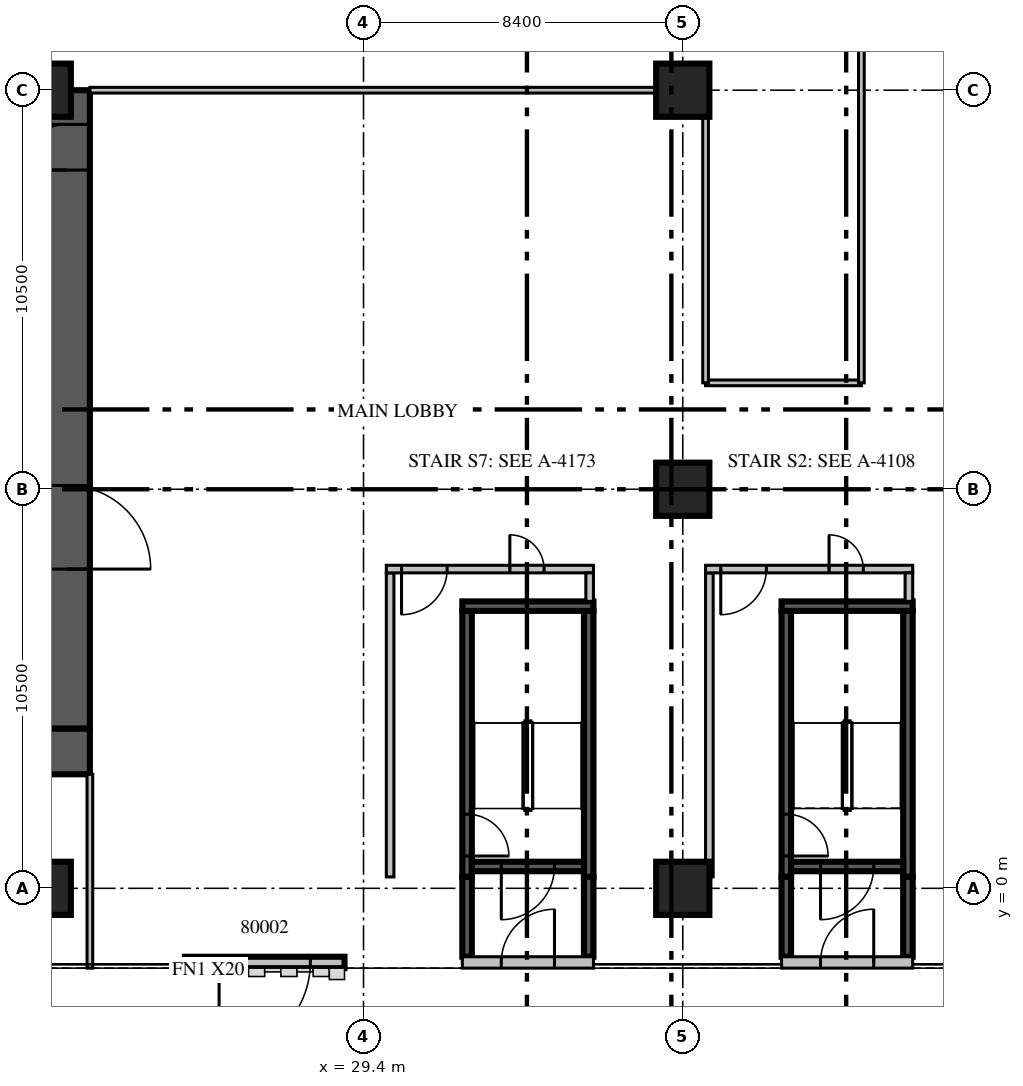
"""IFC4 building model, lengths in metres.
Left out: names, types, materials, properties, quantities, classifications, styles, units other than length and angle.
Written with IfcOpenShell. Run it as: python <this file> out.ifc"""

import sys

from ifc_helpers import new_model, si_unit, direction, frame, frame_2d, origin, origin_2d, place, context, subcontext, project, spatial, rectangle, extrude, source, transform, mapped, element, fill, save


model = new_model("IFC4")
c1 = context("Model", 3, precision=1e-05, world=origin(), true_north=direction((0.0, 1.0)))
c2 = subcontext(c1, "Body", "Model", "MODEL_VIEW")
j1 = project(units=[si_unit("LENGTHUNIT", "METRE"), si_unit("PLANEANGLEUNIT", "RADIAN")], contexts=[c1])
p1 = place(None, origin())
s1 = spatial("IfcSite", under=j1, at=p1, CompositionType="ELEMENT")
p2 = place(p1, origin())
s2 = spatial("IfcBuilding", under=s1, at=p2, CompositionType="ELEMENT")
p3 = place(p2, origin())
s3 = spatial("IfcBuildingStorey", under=s2, at=p3, CompositionType="ELEMENT", Elevation=0.0)
m1 = source(origin(), c2, "Body", "SweptSolid", [
    extrude(rectangle(XDim=1.4, YDim=1.4, at=origin_2d()), origin(), (0.0, 0.0, 1.0), 7.5),
])
for number, where, z_axis, x_axis in (
    (1, (21.0, 0.0, 0.0), (0.0, 0.0, 1.0), (1.0, 0.0, 0.0)),
    (2, (21.0, 21.0, 0.0), (0.0, 0.0, 1.0), (1.0, 0.0, 0.0)),
    (3, (37.8, 0.0, 0.0), (0.0, 0.0, 1.0), (1.0, 0.0, 0.0)),
    (4, (37.8, 10.5, 0.0), (0.0, 0.0, 1.0), (1.0, 0.0, 0.0)),
    (5, (37.8, 21.0, 0.0), (0.0, 0.0, 1.0), (1.0, 0.0, 0.0)),
):
    element("IfcColumn", number, at=place(p3, frame(where, z_axis=z_axis, x_axis=x_axis)), inside=s3, PredefinedType="COLUMN", context=c2, shape_type="MappedRepresentation", body=[
        mapped(m1, transform((0.0, 0.0, 0.0), scale=1.0)),
    ])
p4 = place(p3, frame((21.6, 4.2, 0.0), z_axis=(0.0, 0.0, 1.0), x_axis=(0.0, 1.0, 0.0)))
e6 = element("IfcWall", 6, at=p4, inside=s3, PredefinedType="SHEAR", context=c2, shape_type="SweptSolid", body=[
    extrude(rectangle(XDim=16.8, YDim=1.2, at=frame_2d((8.4, 0.0))), origin(), (0.0, 0.0, 1.0), 7.5),
])
m2 = source(origin(), c2, "Body", "SweptSolid", [
    extrude(rectangle(XDim=2.2, YDim=2.1, at=frame_2d((1.1, 1.05))), frame((0.0, 0.61, 0.0), z_axis=(0.0, -1.0, 0.0), x_axis=(1.0, 0.0, 0.0)), (0.0, 0.0, 1.0), 1.22),
])
p5 = place(p4, frame((4.2, 0.0, 0.0)))
e7 = element("IfcOpeningElement", 7, at=p5, cuts=e6, PredefinedType="OPENING", context=c2, shape_type="MappedRepresentation", body=[
    mapped(m2, transform((0.0, 0.0, 0.0), scale=1.0)),
])
m3 = source(origin(), c2, "Body", "SweptSolid", [
    extrude(rectangle(XDim=1.2, YDim=2.1, at=frame_2d((0.6, 1.05))), frame((0.0, 0.61, 0.0), z_axis=(0.0, -1.0, 0.0), x_axis=(1.0, 0.0, 0.0)), (0.0, 0.0, 1.0), 1.22),
])
p6 = place(p4, frame((14.7, 0.0, 0.0)))
e8 = element("IfcOpeningElement", 8, at=p6, cuts=e6, PredefinedType="OPENING", context=c2, shape_type="MappedRepresentation", body=[
    mapped(m3, transform((0.0, 0.0, 0.0), scale=1.0)),
])
m4 = source(origin(), c2, "Body", "SweptSolid", [
    extrude(rectangle(XDim=18.0, YDim=1.2, at=frame_2d((9.0, 0.0))), origin(), (0.0, 0.0, 1.0), 7.5),
])
p7 = place(p3, frame((4.2, 3.6, 0.0), z_axis=(0.0, 0.0, 1.0), x_axis=(1.0, 0.0, 0.0)))
e9 = element("IfcWall", 9, at=p7, inside=s3, PredefinedType="SHEAR", context=c2, shape_type="MappedRepresentation", body=[
    mapped(m4, transform((0.0, 0.0, 0.0), scale=1.0)),
])
p8 = place(p3, frame((24.7, -1.95, 0.0), z_axis=(0.0, 0.0, 1.0), x_axis=(1.0, 0.0, 0.0)))
e10 = element("IfcWall", 10, at=p8, inside=s3, PredefinedType="STANDARD", context=c2, shape_type="SweptSolid", body=[
    extrude(rectangle(XDim=4.2, YDim=0.3, at=frame_2d((2.1, 0.0))), origin(), (0.0, 0.0, 1.0), 6.9),
])
p9 = place(p8, frame((0.9, 0.0, 0.0)))
e11 = element("IfcOpeningElement", 11, at=p9, cuts=e10, PredefinedType="OPENING", context=c2, shape_type="SweptSolid", body=[
    extrude(rectangle(XDim=2.4, YDim=2.4, at=frame_2d((1.2, 1.2))), frame((0.0, 0.16, 0.0), z_axis=(0.0, -1.0, 0.0), x_axis=(1.0, 0.0, 0.0)), (0.0, 0.0, 1.0), 0.32),
])
p10 = place(p3, frame((40.525, 0.3, 0.0), z_axis=(0.0, 0.0, 1.0), x_axis=(0.0, 1.0, 0.0)))
e12 = element("IfcWall", 12, at=p10, inside=s3, PredefinedType="SOLIDWALL", context=c2, shape_type="SweptSolid", body=[
    extrude(rectangle(XDim=7.0, YDim=0.25, at=frame_2d((3.5, 0.0))), origin(), (0.0, 0.0, 1.0), 6.9),
])
m5 = source(origin(), c2, "Body", "SweptSolid", [
    extrude(rectangle(XDim=1.1, YDim=2.1, at=frame_2d((0.55, 1.05))), frame((0.0, 0.135, 0.0), z_axis=(0.0, -1.0, 0.0), x_axis=(1.0, 0.0, 0.0)), (0.0, 0.0, 1.0), 0.27),
])
p11 = place(p10, frame((0.55, 0.0, 0.0)))
e13 = element("IfcOpeningElement", 13, at=p11, cuts=e12, PredefinedType="OPENING", context=c2, shape_type="MappedRepresentation", body=[
    mapped(m5, transform((0.0, 0.0, 0.0), scale=1.0)),
])
m6 = source(origin(), c2, "Body", "SweptSolid", [
    extrude(rectangle(XDim=7.0, YDim=0.25, at=frame_2d((3.5, 0.0))), origin(), (0.0, 0.0, 1.0), 6.9),
])
p12 = place(p3, frame((43.725, 0.3, 0.0), z_axis=(0.0, 0.0, 1.0), x_axis=(0.0, 1.0, 0.0)))
e14 = element("IfcWall", 14, at=p12, inside=s3, PredefinedType="SOLIDWALL", context=c2, shape_type="MappedRepresentation", body=[
    mapped(m6, transform((0.0, 0.0, 0.0), scale=1.0)),
])
p13 = place(p3, frame((40.4, 7.425, 0.0), z_axis=(0.0, 0.0, 1.0), x_axis=(1.0, 0.0, 0.0)))
e15 = element("IfcWall", 15, at=p13, inside=s3, PredefinedType="SOLIDWALL", context=c2, shape_type="SweptSolid", body=[
    extrude(rectangle(XDim=3.45, YDim=0.25, at=frame_2d((1.725, 0.0))), origin(), (0.0, 0.0, 1.0), 6.9),
])
p14 = place(p3, frame((40.65, 0.575, 0.0), z_axis=(0.0, 0.0, 1.0), x_axis=(1.0, 0.0, 0.0)))
e16 = element("IfcWall", 16, at=p14, inside=s3, PredefinedType="SOLIDWALL", context=c2, shape_type="SweptSolid", body=[
    extrude(rectangle(XDim=2.95, YDim=0.25, at=frame_2d((1.475, 0.0))), origin(), (0.0, 0.0, 1.0), 6.9),
])
p15 = place(p14, frame((0.775, 0.0, 0.0)))
e17 = element("IfcOpeningElement", 17, at=p15, cuts=e16, PredefinedType="OPENING", context=c2, shape_type="SweptSolid", body=[
    extrude(rectangle(XDim=1.4, YDim=2.1, at=frame_2d((0.7, 1.05))), frame((0.0, 0.135, 0.0), z_axis=(0.0, -1.0, 0.0), x_axis=(1.0, 0.0, 0.0)), (0.0, 0.0, 1.0), 0.27),
])
p16 = place(p3, frame((38.5, 0.3, 0.0), z_axis=(0.0, 0.0, 1.0), x_axis=(0.0, 1.0, 0.0)))
e18 = element("IfcWall", 18, at=p16, inside=s3, PredefinedType="PARTITIONING", context=c2, shape_type="SweptSolid", body=[
    extrude(rectangle(XDim=8.0, YDim=0.2, at=frame_2d((4.0, 0.0))), origin(), (0.0, 0.0, 1.0), 6.9),
])
p17 = place(p3, frame((38.4, 8.4, 0.0), z_axis=(0.0, 0.0, 1.0), x_axis=(1.0, 0.0, 0.0)))
e19 = element("IfcWall", 19, at=p17, inside=s3, PredefinedType="PARTITIONING", context=c2, shape_type="SweptSolid", body=[
    extrude(rectangle(XDim=5.45, YDim=0.2, at=frame_2d((2.725, 0.0))), origin(), (0.0, 0.0, 1.0), 6.9),
])
m7 = source(origin(), c2, "Body", "SweptSolid", [
    extrude(rectangle(XDim=1.2, YDim=2.1, at=frame_2d((0.6, 1.05))), frame((0.0, 0.11, 0.0), z_axis=(0.0, -1.0, 0.0), x_axis=(1.0, 0.0, 0.0)), (0.0, 0.0, 1.0), 0.22),
])
p18 = place(p17, frame((0.4, 0.0, 0.0)))
e20 = element("IfcOpeningElement", 20, at=p18, cuts=e19, PredefinedType="OPENING", context=c2, shape_type="MappedRepresentation", body=[
    mapped(m7, transform((0.0, 0.0, 0.0), scale=1.0)),
])
m8 = source(origin(), c2, "Body", "SweptSolid", [
    extrude(rectangle(XDim=0.9, YDim=2.1, at=frame_2d((0.45, 1.05))), frame((0.0, 0.11, 0.0), z_axis=(0.0, -1.0, 0.0), x_axis=(1.0, 0.0, 0.0)), (0.0, 0.0, 1.0), 0.22),
])
p19 = place(p17, frame((3.25, 0.0, 0.0)))
e21 = element("IfcOpeningElement", 21, at=p19, cuts=e19, PredefinedType="OPENING", context=c2, shape_type="MappedRepresentation", body=[
    mapped(m8, transform((0.0, 0.0, 0.0), scale=1.0)),
])
p20 = place(p3, frame((43.75, 7.55, 0.0), z_axis=(0.0, 0.0, 1.0), x_axis=(0.0, 1.0, 0.0)))
e22 = element("IfcWall", 22, at=p20, inside=s3, PredefinedType="PARTITIONING", context=c2, shape_type="SweptSolid", body=[
    extrude(rectangle(XDim=0.75, YDim=0.2, at=frame_2d((0.375, 0.0))), origin(), (0.0, 0.0, 1.0), 6.9),
])
p21 = place(p3, frame((40.525, -1.8, 0.0), z_axis=(0.0, 0.0, 1.0), x_axis=(0.0, 1.0, 0.0)))
e23 = element("IfcWall", 23, at=p21, inside=s3, PredefinedType="SOLIDWALL", context=c2, shape_type="SweptSolid", body=[
    extrude(rectangle(XDim=2.1, YDim=0.25, at=frame_2d((1.05, 0.0))), origin(), (0.0, 0.0, 1.0), 6.9),
])
m9 = source(origin(), c2, "Body", "SweptSolid", [
    extrude(rectangle(XDim=2.1, YDim=0.25, at=frame_2d((1.05, 0.0))), origin(), (0.0, 0.0, 1.0), 6.9),
])
p22 = place(p3, frame((43.725, -1.8, 0.0), z_axis=(0.0, 0.0, 1.0), x_axis=(0.0, 1.0, 0.0)))
e24 = element("IfcWall", 24, at=p22, inside=s3, PredefinedType="SOLIDWALL", context=c2, shape_type="MappedRepresentation", body=[
    mapped(m9, transform((0.0, 0.0, 0.0), scale=1.0)),
])
p23 = place(p3, frame((43.85, -1.95, 0.0), z_axis=(0.0, 0.0, 1.0), x_axis=(-1.0, 0.0, 0.0)))
e25 = element("IfcWall", 25, at=p23, inside=s3, PredefinedType="PARTITIONING", context=c2, shape_type="SweptSolid", body=[
    extrude(rectangle(XDim=3.45, YDim=0.3, at=frame_2d((1.725, 0.0))), origin(), (0.0, 0.0, 1.0), 6.9),
])
p24 = place(p23, frame((1.025, 0.0, 0.0)))
e26 = element("IfcOpeningElement", 26, at=p24, cuts=e25, PredefinedType="OPENING", context=c2, shape_type="SweptSolid", body=[
    extrude(rectangle(XDim=1.4, YDim=2.1, at=frame_2d((0.7, 1.05))), frame((0.0, 0.16, 0.0), z_axis=(0.0, -1.0, 0.0), x_axis=(1.0, 0.0, 0.0)), (0.0, 0.0, 1.0), 0.32),
])
p25 = place(p3, frame((32.125, 0.3, 0.0), z_axis=(0.0, 0.0, 1.0), x_axis=(0.0, 1.0, 0.0)))
e27 = element("IfcWall", 27, at=p25, inside=s3, PredefinedType="SOLIDWALL", context=c2, shape_type="MappedRepresentation", body=[
    mapped(m6, transform((0.0, 0.0, 0.0), scale=1.0)),
])
p26 = place(p25, frame((0.55, 0.0, 0.0)))
e28 = element("IfcOpeningElement", 28, at=p26, cuts=e27, PredefinedType="OPENING", context=c2, shape_type="MappedRepresentation", body=[
    mapped(m5, transform((0.0, 0.0, 0.0), scale=1.0)),
])
p27 = place(p3, frame((35.325, 0.3, 0.0), z_axis=(0.0, 0.0, 1.0), x_axis=(0.0, 1.0, 0.0)))
e29 = element("IfcWall", 29, at=p27, inside=s3, PredefinedType="SOLIDWALL", context=c2, shape_type="MappedRepresentation", body=[
    mapped(m6, transform((0.0, 0.0, 0.0), scale=1.0)),
])
m10 = source(origin(), c2, "Body", "SweptSolid", [
    extrude(rectangle(XDim=3.45, YDim=0.25, at=frame_2d((1.725, 0.0))), origin(), (0.0, 0.0, 1.0), 6.9),
])
p28 = place(p3, frame((32.0, 7.425, 0.0), z_axis=(0.0, 0.0, 1.0), x_axis=(1.0, 0.0, 0.0)))
e30 = element("IfcWall", 30, at=p28, inside=s3, PredefinedType="SOLIDWALL", context=c2, shape_type="MappedRepresentation", body=[
    mapped(m10, transform((0.0, 0.0, 0.0), scale=1.0)),
])
m11 = source(origin(), c2, "Body", "SweptSolid", [
    extrude(rectangle(XDim=2.95, YDim=0.25, at=frame_2d((1.475, 0.0))), origin(), (0.0, 0.0, 1.0), 6.9),
])
p29 = place(p3, frame((32.25, 0.575, 0.0), z_axis=(0.0, 0.0, 1.0), x_axis=(1.0, 0.0, 0.0)))
e31 = element("IfcWall", 31, at=p29, inside=s3, PredefinedType="SOLIDWALL", context=c2, shape_type="MappedRepresentation", body=[
    mapped(m11, transform((0.0, 0.0, 0.0), scale=1.0)),
])
m12 = source(origin(), c2, "Body", "SweptSolid", [
    extrude(rectangle(XDim=1.4, YDim=2.1, at=frame_2d((0.7, 1.05))), frame((0.0, 0.135, 0.0), z_axis=(0.0, -1.0, 0.0), x_axis=(1.0, 0.0, 0.0)), (0.0, 0.0, 1.0), 0.27),
])
p30 = place(p29, frame((0.775, 0.0, 0.0)))
e32 = element("IfcOpeningElement", 32, at=p30, cuts=e31, PredefinedType="OPENING", context=c2, shape_type="MappedRepresentation", body=[
    mapped(m12, transform((0.0, 0.0, 0.0), scale=1.0)),
])
m13 = source(origin(), c2, "Body", "SweptSolid", [
    extrude(rectangle(XDim=8.0, YDim=0.2, at=frame_2d((4.0, 0.0))), origin(), (0.0, 0.0, 1.0), 6.9),
])
p31 = place(p3, frame((30.1, 0.3, 0.0), z_axis=(0.0, 0.0, 1.0), x_axis=(0.0, 1.0, 0.0)))
e33 = element("IfcWall", 33, at=p31, inside=s3, PredefinedType="PARTITIONING", context=c2, shape_type="MappedRepresentation", body=[
    mapped(m13, transform((0.0, 0.0, 0.0), scale=1.0)),
])
m14 = source(origin(), c2, "Body", "SweptSolid", [
    extrude(rectangle(XDim=5.45, YDim=0.2, at=frame_2d((2.725, 0.0))), origin(), (0.0, 0.0, 1.0), 6.9),
])
p32 = place(p3, frame((30.0, 8.4, 0.0), z_axis=(0.0, 0.0, 1.0), x_axis=(1.0, 0.0, 0.0)))
e34 = element("IfcWall", 34, at=p32, inside=s3, PredefinedType="PARTITIONING", context=c2, shape_type="MappedRepresentation", body=[
    mapped(m14, transform((0.0, 0.0, 0.0), scale=1.0)),
])
p33 = place(p32, frame((0.4, 0.0, 0.0)))
e35 = element("IfcOpeningElement", 35, at=p33, cuts=e34, PredefinedType="OPENING", context=c2, shape_type="MappedRepresentation", body=[
    mapped(m7, transform((0.0, 0.0, 0.0), scale=1.0)),
])
p34 = place(p32, frame((3.25, 0.0, 0.0)))
e36 = element("IfcOpeningElement", 36, at=p34, cuts=e34, PredefinedType="OPENING", context=c2, shape_type="MappedRepresentation", body=[
    mapped(m8, transform((0.0, 0.0, 0.0), scale=1.0)),
])
m15 = source(origin(), c2, "Body", "SweptSolid", [
    extrude(rectangle(XDim=0.75, YDim=0.2, at=frame_2d((0.375, 0.0))), origin(), (0.0, 0.0, 1.0), 6.9),
])
p35 = place(p3, frame((35.35, 7.55, 0.0), z_axis=(0.0, 0.0, 1.0), x_axis=(0.0, 1.0, 0.0)))
e37 = element("IfcWall", 37, at=p35, inside=s3, PredefinedType="PARTITIONING", context=c2, shape_type="MappedRepresentation", body=[
    mapped(m15, transform((0.0, 0.0, 0.0), scale=1.0)),
])
for number, where, z_axis, x_axis in (
    (38, (32.125, -1.8, 0.0), (0.0, 0.0, 1.0), (0.0, 1.0, 0.0)),
    (39, (35.325, -1.8, 0.0), (0.0, 0.0, 1.0), (0.0, 1.0, 0.0)),
):
    element("IfcWall", number, at=place(p3, frame(where, z_axis=z_axis, x_axis=x_axis)), inside=s3, PredefinedType="SOLIDWALL", context=c2, shape_type="MappedRepresentation", body=[
        mapped(m9, transform((0.0, 0.0, 0.0), scale=1.0)),
    ])
m16 = source(origin(), c2, "Body", "SweptSolid", [
    extrude(rectangle(XDim=3.45, YDim=0.3, at=frame_2d((1.725, 0.0))), origin(), (0.0, 0.0, 1.0), 6.9),
])
p36 = place(p3, frame((35.45, -1.95, 0.0), z_axis=(0.0, 0.0, 1.0), x_axis=(-1.0, 0.0, 0.0)))
e40 = element("IfcWall", 40, at=p36, inside=s3, PredefinedType="PARTITIONING", context=c2, shape_type="MappedRepresentation", body=[
    mapped(m16, transform((0.0, 0.0, 0.0), scale=1.0)),
])
m17 = source(origin(), c2, "Body", "SweptSolid", [
    extrude(rectangle(XDim=1.4, YDim=2.1, at=frame_2d((0.7, 1.05))), frame((0.0, 0.16, 0.0), z_axis=(0.0, -1.0, 0.0), x_axis=(1.0, 0.0, 0.0)), (0.0, 0.0, 1.0), 0.32),
])
p37 = place(p36, frame((1.025, 0.0, 0.0)))
e41 = element("IfcOpeningElement", 41, at=p37, cuts=e40, PredefinedType="OPENING", context=c2, shape_type="MappedRepresentation", body=[
    mapped(m17, transform((0.0, 0.0, 0.0), scale=1.0)),
])
p38 = place(p3, frame((38.4, 13.3, 0.0), z_axis=(0.0, 0.0, 1.0), x_axis=(1.0, 0.0, 0.0)))
e42 = element("IfcWall", 42, at=p38, inside=s3, PredefinedType="PARTITIONING", context=c2, shape_type="SweptSolid", body=[
    extrude(rectangle(XDim=4.1, YDim=0.15, at=frame_2d((2.05, 0.0))), origin(), (0.0, 0.0, 1.0), 6.9),
])
p39 = place(p3, frame((22.2, 21.0, 0.0), z_axis=(0.0, 0.0, 1.0), x_axis=(1.0, 0.0, 0.0)))
e43 = element("IfcWall", 43, at=p39, inside=s3, PredefinedType="PARTITIONING", context=c2, shape_type="SweptSolid", body=[
    extrude(rectangle(XDim=16.2, YDim=0.15, at=frame_2d((8.1, 0.0))), origin(), (0.0, 0.0, 1.0), 6.9),
])
m18 = source(origin(), c2, "Body", "SweptSolid", [
    extrude(rectangle(XDim=5.1, YDim=0.15, at=frame_2d((2.55, 0.0))), origin(), (0.0, 0.0, 1.0), 6.9),
])
p40 = place(p3, frame((22.2, -2.1, 0.0), z_axis=(0.0, 0.0, 1.0), x_axis=(0.0, 1.0, 0.0)))
e44 = element("IfcWall", 44, at=p40, inside=s3, PredefinedType="PARTITIONING", context=c2, shape_type="MappedRepresentation", body=[
    mapped(m18, transform((0.0, 0.0, 0.0), scale=1.0)),
])
p41 = place(p3, frame((38.4, 13.3, 0.0), z_axis=(0.0, 0.0, 1.0), x_axis=(0.0, 1.0, 0.0)))
e45 = element("IfcWall", 45, at=p41, inside=s3, PredefinedType="PARTITIONING", context=c2, shape_type="SweptSolid", body=[
    extrude(rectangle(XDim=7.7, YDim=0.15, at=frame_2d((3.85, 0.0))), origin(), (0.0, 0.0, 1.0), 6.9),
])
m19 = source(origin(), c2, "Body", "SweptSolid", [
    extrude(rectangle(XDim=29.2, YDim=0.15, at=frame_2d((14.6, 0.0))), origin(), (0.0, 0.0, 1.0), 6.9),
])
p42 = place(p3, frame((42.5, 13.3, 0.0), z_axis=(0.0, 0.0, 1.0), x_axis=(0.0, 1.0, 0.0)))
e46 = element("IfcWall", 46, at=p42, inside=s3, PredefinedType="PARTITIONING", context=c2, shape_type="MappedRepresentation", body=[
    mapped(m19, transform((0.0, 0.0, 0.0), scale=1.0)),
])
m20 = source(origin(), c2, "Body", "SweptSolid", [
    extrude(rectangle(XDim=1.8, YDim=2.1, at=frame_2d((0.9, 1.05))), frame((0.0, 0.085, 0.0), z_axis=(0.0, -1.0, 0.0), x_axis=(1.0, 0.0, 0.0)), (0.0, 0.0, 1.0), 0.17),
])
p43 = place(p42, frame((13.7, 0.0, 0.0)))
e47 = element("IfcOpeningElement", 47, at=p43, cuts=e46, PredefinedType="OPENING", context=c2, shape_type="MappedRepresentation", body=[
    mapped(m20, transform((0.0, 0.0, 0.0), scale=1.0)),
])
p44 = place(p9, origin())
e48 = element("IfcDoor", 48, at=p44, inside=s3, OperationType="DOUBLE_DOOR_SINGLE_SWING", PredefinedType="DOOR", context=c2, shape_type="SweptSolid", body=[
    extrude(rectangle(XDim=2.4, YDim=2.4, at=frame_2d((1.2, 1.2))), frame((0.0, 0.025, 0.0), z_axis=(0.0, -1.0, 0.0), x_axis=(1.0, 0.0, 0.0)), (0.0, 0.0, 1.0), 0.05),
])
fill(e11, e48)
m21 = source(origin(), c2, "Body", "SweptSolid", [
    extrude(rectangle(XDim=1.1, YDim=2.1, at=frame_2d((0.55, 1.05))), frame((0.0, 0.025, 0.0), z_axis=(0.0, -1.0, 0.0), x_axis=(1.0, 0.0, 0.0)), (0.0, 0.0, 1.0), 0.05),
])
p45 = place(p11, origin())
e49 = element("IfcDoor", 49, at=p45, inside=s3, OperationType="SINGLE_SWING_RIGHT", PredefinedType="DOOR", context=c2, shape_type="MappedRepresentation", body=[
    mapped(m21, transform((0.0, 0.0, 0.0), scale=1.0)),
])
fill(e13, e49)
p46 = place(p15, origin())
e50 = element("IfcDoor", 50, at=p46, inside=s3, OperationType="DOUBLE_DOOR_SINGLE_SWING", PredefinedType="DOOR", context=c2, shape_type="SweptSolid", body=[
    extrude(rectangle(XDim=1.4, YDim=2.1, at=frame_2d((0.7, 1.05))), frame((0.0, 0.025, 0.0), z_axis=(0.0, -1.0, 0.0), x_axis=(1.0, 0.0, 0.0)), (0.0, 0.0, 1.0), 0.05),
])
fill(e17, e50)
m22 = source(origin(), c2, "Body", "SweptSolid", [
    extrude(rectangle(XDim=1.2, YDim=2.1, at=frame_2d((0.6, 1.05))), frame((0.0, 0.025, 0.0), z_axis=(0.0, -1.0, 0.0), x_axis=(1.0, 0.0, 0.0)), (0.0, 0.0, 1.0), 0.05),
])
p47 = place(p18, origin())
e51 = element("IfcDoor", 51, at=p47, inside=s3, OperationType="SINGLE_SWING_RIGHT", PredefinedType="DOOR", context=c2, shape_type="MappedRepresentation", body=[
    mapped(m22, transform((0.0, 0.0, 0.0), scale=1.0)),
])
fill(e20, e51)
m23 = source(origin(), c2, "Body", "SweptSolid", [
    extrude(rectangle(XDim=0.9, YDim=2.1, at=frame_2d((0.45, 1.05))), frame((0.0, 0.025, 0.0), z_axis=(0.0, -1.0, 0.0), x_axis=(1.0, 0.0, 0.0)), (0.0, 0.0, 1.0), 0.05),
])
p48 = place(p19, origin())
e52 = element("IfcDoor", 52, at=p48, inside=s3, OperationType="SINGLE_SWING_LEFT", PredefinedType="DOOR", context=c2, shape_type="MappedRepresentation", body=[
    mapped(m23, transform((0.0, 0.0, 0.0), scale=1.0)),
])
fill(e21, e52)
m24 = source(origin(), c2, "Body", "SweptSolid", [
    extrude(rectangle(XDim=1.4, YDim=2.1, at=frame_2d((0.7, 1.05))), frame((0.0, 0.025, 0.0), z_axis=(0.0, -1.0, 0.0), x_axis=(1.0, 0.0, 0.0)), (0.0, 0.0, 1.0), 0.05),
])
p49 = place(p24, origin())
e53 = element("IfcDoor", 53, at=p49, inside=s3, OperationType="DOUBLE_DOOR_SINGLE_SWING", PredefinedType="DOOR", context=c2, shape_type="MappedRepresentation", body=[
    mapped(m24, transform((0.0, 0.0, 0.0), scale=1.0)),
])
fill(e26, e53)
p50 = place(p26, origin())
e54 = element("IfcDoor", 54, at=p50, inside=s3, OperationType="SINGLE_SWING_RIGHT", PredefinedType="DOOR", context=c2, shape_type="MappedRepresentation", body=[
    mapped(m21, transform((0.0, 0.0, 0.0), scale=1.0)),
])
fill(e28, e54)
p51 = place(p30, origin())
e55 = element("IfcDoor", 55, at=p51, inside=s3, OperationType="DOUBLE_DOOR_SINGLE_SWING", PredefinedType="DOOR", context=c2, shape_type="MappedRepresentation", body=[
    mapped(m24, transform((0.0, 0.0, 0.0), scale=1.0)),
])
fill(e32, e55)
p52 = place(p33, origin())
e56 = element("IfcDoor", 56, at=p52, inside=s3, OperationType="SINGLE_SWING_RIGHT", PredefinedType="DOOR", context=c2, shape_type="MappedRepresentation", body=[
    mapped(m22, transform((0.0, 0.0, 0.0), scale=1.0)),
])
fill(e35, e56)
p53 = place(p34, origin())
e57 = element("IfcDoor", 57, at=p53, inside=s3, OperationType="SINGLE_SWING_LEFT", PredefinedType="DOOR", context=c2, shape_type="MappedRepresentation", body=[
    mapped(m23, transform((0.0, 0.0, 0.0), scale=1.0)),
])
fill(e36, e57)
p54 = place(p37, origin())
e58 = element("IfcDoor", 58, at=p54, inside=s3, OperationType="DOUBLE_DOOR_SINGLE_SWING", PredefinedType="DOOR", context=c2, shape_type="MappedRepresentation", body=[
    mapped(m24, transform((0.0, 0.0, 0.0), scale=1.0)),
])
fill(e41, e58)
m25 = source(origin(), c2, "Body", "SweptSolid", [
    extrude(rectangle(XDim=2.2, YDim=2.1, at=frame_2d((1.1, 1.05))), frame((0.0, 0.025, 0.0), z_axis=(0.0, -1.0, 0.0), x_axis=(1.0, 0.0, 0.0)), (0.0, 0.0, 1.0), 0.05),
])
p55 = place(p5, origin())
e59 = element("IfcDoor", 59, at=p55, inside=s3, OperationType="DOUBLE_DOOR_SINGLE_SWING", PredefinedType="DOOR", context=c2, shape_type="MappedRepresentation", body=[
    mapped(m25, transform((0.0, 0.0, 0.0), scale=1.0)),
])
fill(e7, e59)
p56 = place(p6, origin())
e60 = element("IfcDoor", 60, at=p56, inside=s3, OperationType="SINGLE_SWING_LEFT", PredefinedType="DOOR", context=c2, shape_type="MappedRepresentation", body=[
    mapped(m22, transform((0.0, 0.0, 0.0), scale=1.0)),
])
fill(e8, e60)
save(model, sys.argv[1])
